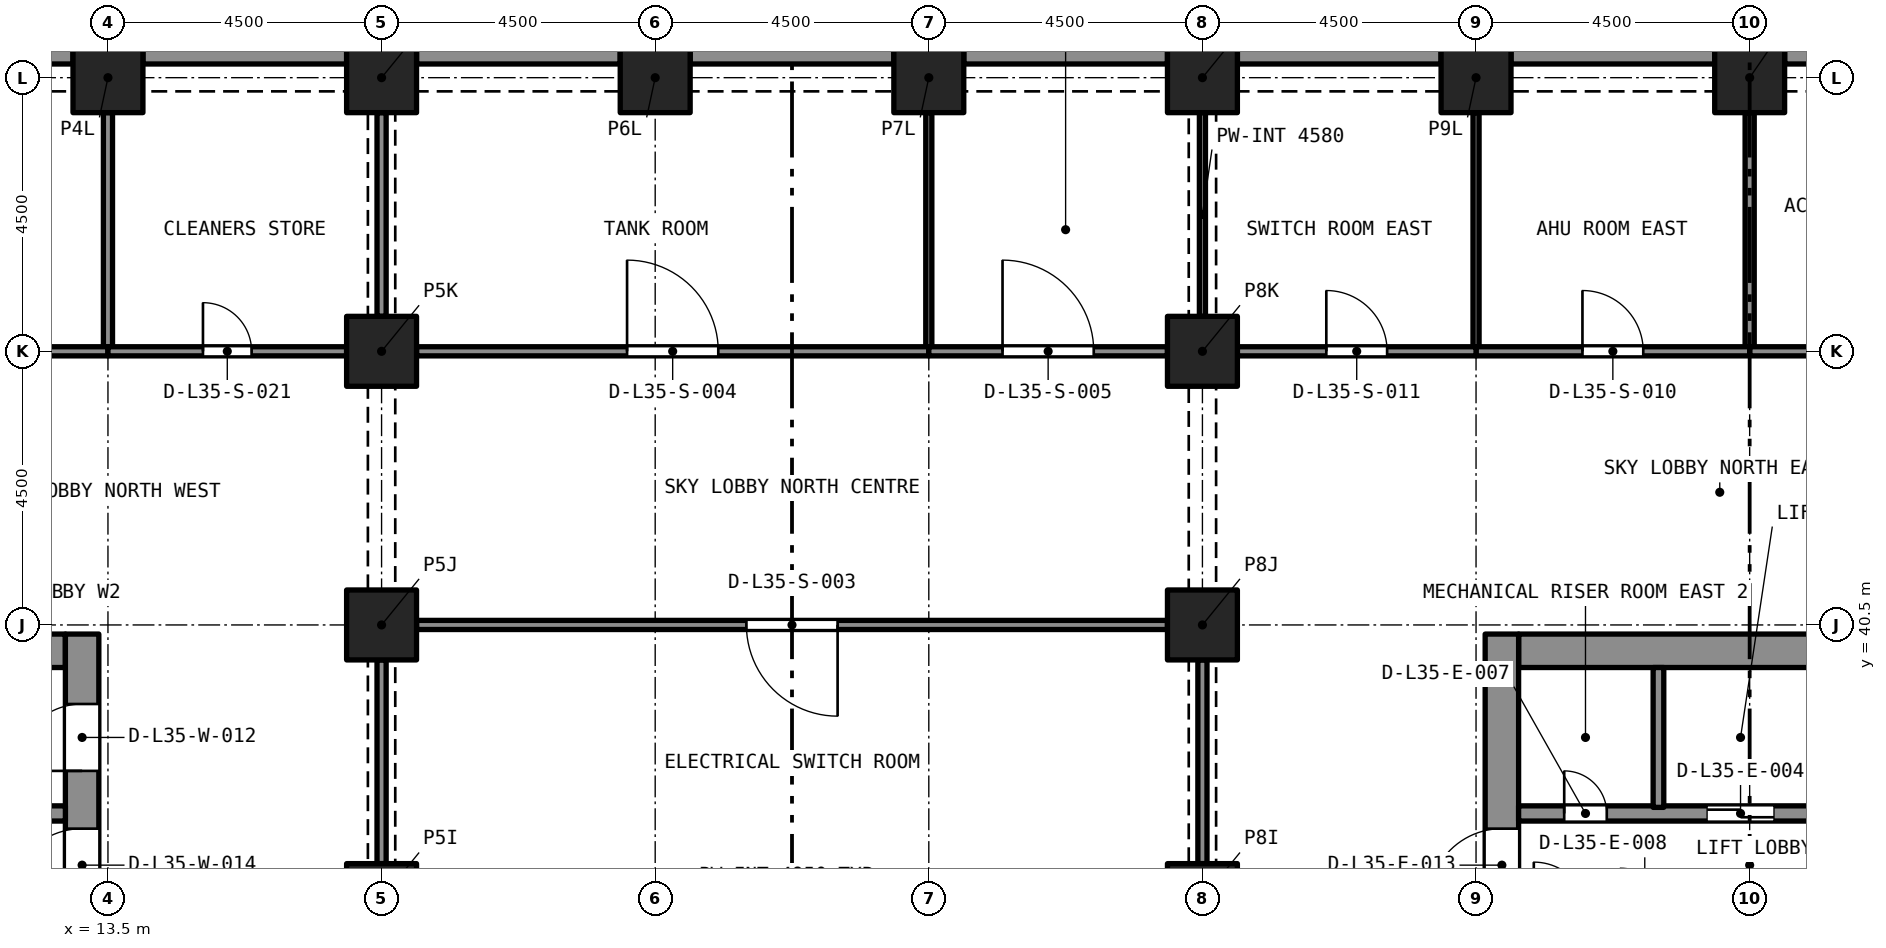
"""IFC4 building model, lengths in metres.
Left out: names, types, materials, properties, quantities, classifications, styles, units other than length and angle.
Written with IfcOpenShell. Run it as: python <this file> out.ifc"""

import sys

from ifc_helpers import new_model, si_unit, direction, frame, frame_2d, origin, origin_2d, place, context, subcontext, project, spatial, rectangle, extrude, element, fill, save


model = new_model("IFC4")
c1 = context("Model", 3, precision=1e-05, world=origin(), true_north=direction((0.0, 1.0)))
c2 = subcontext(c1, "Body", "Model", "MODEL_VIEW")
j1 = project(units=[si_unit("LENGTHUNIT", "METRE"), si_unit("PLANEANGLEUNIT", "RADIAN")], contexts=[c1])
p1 = place(None, origin())
s1 = spatial("IfcSite", under=j1, at=p1, CompositionType="ELEMENT")
p2 = place(p1, origin())
s2 = spatial("IfcBuilding", under=s1, at=p2, CompositionType="ELEMENT")
p3 = place(p2, frame((0.0, 0.0, 124.8)))
s3 = spatial("IfcBuildingStorey", under=s2, at=p3, CompositionType="ELEMENT", Elevation=124.8)
for number, where, z_axis, x_axis in (
    (1, (18.0, 36.0, 0.0), (0.0, 0.0, 1.0), (1.0, 0.0, 0.0)),
    (2, (31.5, 36.0, 0.0), (0.0, 0.0, 1.0), (1.0, 0.0, 0.0)),
    (3, (18.0, 40.5, 0.0), (0.0, 0.0, 1.0), (1.0, 0.0, 0.0)),
    (4, (31.5, 40.5, 0.0), (0.0, 0.0, 1.0), (1.0, 0.0, 0.0)),
    (5, (18.0, 45.0, 0.0), (0.0, 0.0, 1.0), (1.0, 0.0, 0.0)),
    (6, (31.5, 45.0, 0.0), (0.0, 0.0, 1.0), (1.0, 0.0, 0.0)),
    (7, (13.5, 49.5, 0.0), (0.0, 0.0, 1.0), (1.0, 0.0, 0.0)),
    (8, (18.0, 49.5, 0.0), (0.0, 0.0, 1.0), (1.0, 0.0, 0.0)),
    (9, (22.5, 49.5, 0.0), (0.0, 0.0, 1.0), (1.0, 0.0, 0.0)),
    (10, (27.0, 49.5, 0.0), (0.0, 0.0, 1.0), (1.0, 0.0, 0.0)),
    (11, (31.5, 49.5, 0.0), (0.0, 0.0, 1.0), (1.0, 0.0, 0.0)),
    (12, (36.0, 49.5, 0.0), (0.0, 0.0, 1.0), (1.0, 0.0, 0.0)),
    (13, (40.5, 49.5, 0.0), (0.0, 0.0, 1.0), (1.0, 0.0, 0.0)),
):
    element("IfcColumn", number, at=place(p3, frame(where, z_axis=z_axis, x_axis=x_axis)), inside=s3, PredefinedType="COLUMN", context=c2, shape_type="SweptSolid", body=[
        extrude(rectangle(XDim=1.15, YDim=1.15, at=origin_2d()), origin(), (0.0, 0.0, 1.0), 5.4),
    ])
p4 = place(p3, frame((5.2, 40.075, 0.0), z_axis=(0.0, 0.0, 1.0), x_axis=(1.0, 0.0, 0.0)))
e14 = element("IfcWall", 14, at=p4, inside=s3, PredefinedType="SOLIDWALL", context=c2, shape_type="SweptSolid", body=[
    extrude(rectangle(XDim=7.6, YDim=0.55, at=frame_2d((3.8, 0.0))), origin(), (0.0, 0.0, 1.0), 5.4),
])
p5 = place(p3, frame((13.075, 27.15, 0.0), z_axis=(0.0, 0.0, 1.0), x_axis=(0.0, 1.0, 0.0)))
e15 = element("IfcWall", 15, at=p5, inside=s3, PredefinedType="SOLIDWALL", context=c2, shape_type="SweptSolid", body=[
    extrude(rectangle(XDim=13.2, YDim=0.55, at=frame_2d((6.6, 0.0))), origin(), (0.0, 0.0, 1.0), 5.4),
])
p6 = place(p5, frame((10.95, 0.0, 0.0)))
e16 = element("IfcOpeningElement", 16, at=p6, cuts=e15, PredefinedType="OPENING", context=c2, shape_type="SweptSolid", body=[
    extrude(rectangle(XDim=1.1, YDim=2.1, at=frame_2d((0.55, 1.05))), frame((0.0, 0.285, 0.0), z_axis=(0.0, -1.0, 0.0), x_axis=(1.0, 0.0, 0.0)), (0.0, 0.0, 1.0), 0.57),
])
p7 = place(p5, frame((8.8, 0.0, 0.0)))
e17 = element("IfcOpeningElement", 17, at=p7, cuts=e15, PredefinedType="OPENING", context=c2, shape_type="SweptSolid", body=[
    extrude(rectangle(XDim=1.2, YDim=2.1, at=frame_2d((0.6, 1.05))), frame((0.0, 0.285, 0.0), z_axis=(0.0, -1.0, 0.0), x_axis=(1.0, 0.0, 0.0)), (0.0, 0.0, 1.0), 0.57),
])
p8 = place(p3, frame((36.7, 40.075, 0.0), z_axis=(0.0, 0.0, 1.0), x_axis=(1.0, 0.0, 0.0)))
e18 = element("IfcWall", 18, at=p8, inside=s3, PredefinedType="SOLIDWALL", context=c2, shape_type="SweptSolid", body=[
    extrude(rectangle(XDim=7.6, YDim=0.55, at=frame_2d((3.8, 0.0))), origin(), (0.0, 0.0, 1.0), 5.4),
])
p9 = place(p3, frame((36.425, 27.15, 0.0), z_axis=(0.0, 0.0, 1.0), x_axis=(0.0, 1.0, 0.0)))
e19 = element("IfcWall", 19, at=p9, inside=s3, PredefinedType="SOLIDWALL", context=c2, shape_type="SweptSolid", body=[
    extrude(rectangle(XDim=13.2, YDim=0.55, at=frame_2d((6.6, 0.0))), origin(), (0.0, 0.0, 1.0), 5.4),
])
p10 = place(p9, frame((8.8, 0.0, 0.0)))
e20 = element("IfcOpeningElement", 20, at=p10, cuts=e19, PredefinedType="OPENING", context=c2, shape_type="SweptSolid", body=[
    extrude(rectangle(XDim=1.2, YDim=2.1, at=frame_2d((0.6, 1.05))), frame((0.0, 0.285, 0.0), z_axis=(0.0, -1.0, 0.0), x_axis=(1.0, 0.0, 0.0)), (0.0, 0.0, 1.0), 0.57),
])
for number, where, z_axis, x_axis in (
    (21, (41.075, 49.875, 0.0), (0.0, 0.0, 1.0), (1.0, 0.0, 0.0)),
    (22, (36.575, 49.875, 0.0), (0.0, 0.0, 1.0), (1.0, 0.0, 0.0)),
    (23, (32.075, 49.875, 0.0), (0.0, 0.0, 1.0), (1.0, 0.0, 0.0)),
    (24, (27.575, 49.875, 0.0), (0.0, 0.0, 1.0), (1.0, 0.0, 0.0)),
    (25, (23.075, 49.875, 0.0), (0.0, 0.0, 1.0), (1.0, 0.0, 0.0)),
    (26, (18.575, 49.875, 0.0), (0.0, 0.0, 1.0), (1.0, 0.0, 0.0)),
    (27, (14.075, 49.875, 0.0), (0.0, 0.0, 1.0), (1.0, 0.0, 0.0)),
    (28, (9.575, 49.875, 0.0), (0.0, 0.0, 1.0), (1.0, 0.0, 0.0)),
):
    element("IfcWall", number, at=place(p3, frame(where, z_axis=z_axis, x_axis=x_axis)), inside=s3, PredefinedType="SOLIDWALL", context=c2, shape_type="SweptSolid", body=[
        extrude(rectangle(XDim=3.35, YDim=0.3, at=frame_2d((1.675, 0.0))), origin(), (0.0, 0.0, 1.0), 5.4),
    ])
p11 = place(p3, frame((5.2, 37.4, 0.0), z_axis=(0.0, 0.0, 1.0), x_axis=(1.0, 0.0, 0.0)))
e29 = element("IfcWall", 29, at=p11, inside=s3, PredefinedType="SOLIDWALL", context=c2, shape_type="SweptSolid", body=[
    extrude(rectangle(XDim=7.6, YDim=0.25, at=frame_2d((3.8, 0.0))), origin(), (0.0, 0.0, 1.0), 5.1),
])
p12 = place(p11, frame((0.7, 0.0, 0.0)))
e30 = element("IfcOpeningElement", 30, at=p12, cuts=e29, PredefinedType="OPENING", context=c2, shape_type="SweptSolid", body=[
    extrude(rectangle(XDim=1.1, YDim=2.4, at=frame_2d((0.55, 1.2))), frame((0.0, 0.135, 0.0), z_axis=(0.0, -1.0, 0.0), x_axis=(1.0, 0.0, 0.0)), (0.0, 0.0, 1.0), 0.27),
])
p13 = place(p3, frame((36.7, 37.4, 0.0), z_axis=(0.0, 0.0, 1.0), x_axis=(1.0, 0.0, 0.0)))
e31 = element("IfcWall", 31, at=p13, inside=s3, PredefinedType="SOLIDWALL", context=c2, shape_type="SweptSolid", body=[
    extrude(rectangle(XDim=7.6, YDim=0.25, at=frame_2d((3.8, 0.0))), origin(), (0.0, 0.0, 1.0), 5.1),
])
p14 = place(p13, frame((5.8, 0.0, 0.0)))
e32 = element("IfcOpeningElement", 32, at=p14, cuts=e31, PredefinedType="OPENING", context=c2, shape_type="SweptSolid", body=[
    extrude(rectangle(XDim=1.1, YDim=2.4, at=frame_2d((0.55, 1.2))), frame((0.0, 0.135, 0.0), z_axis=(0.0, -1.0, 0.0), x_axis=(1.0, 0.0, 0.0)), (0.0, 0.0, 1.0), 0.27),
])
p15 = place(p13, frame((3.1, 0.0, 0.0)))
e33 = element("IfcOpeningElement", 33, at=p15, cuts=e31, PredefinedType="OPENING", context=c2, shape_type="SweptSolid", body=[
    extrude(rectangle(XDim=1.1, YDim=2.4, at=frame_2d((0.55, 1.2))), frame((0.0, 0.135, 0.0), z_axis=(0.0, -1.0, 0.0), x_axis=(1.0, 0.0, 0.0)), (0.0, 0.0, 1.0), 0.27),
])
p16 = place(p13, frame((0.75, 0.0, 0.0)))
e34 = element("IfcOpeningElement", 34, at=p16, cuts=e31, PredefinedType="OPENING", context=c2, shape_type="SweptSolid", body=[
    extrude(rectangle(XDim=0.7, YDim=2.1, at=frame_2d((0.35, 1.05))), frame((0.0, 0.135, 0.0), z_axis=(0.0, -1.0, 0.0), x_axis=(1.0, 0.0, 0.0)), (0.0, 0.0, 1.0), 0.27),
])
p17 = place(p3, frame((39.0, 37.5, 0.0), z_axis=(0.0, 0.0, 1.0), x_axis=(0.0, 1.0, 0.0)))
e35 = element("IfcWall", 35, at=p17, inside=s3, PredefinedType="SOLIDWALL", context=c2, shape_type="SweptSolid", body=[
    extrude(rectangle(XDim=2.3, YDim=0.175, at=frame_2d((1.15, 0.0))), origin(), (0.0, 0.0, 1.0), 5.1),
])
p18 = place(p3, frame((30.925, 40.5, 0.0), z_axis=(0.0, 0.0, 1.0), x_axis=(-1.0, 0.0, 0.0)))
e36 = element("IfcWall", 36, at=p18, inside=s3, PredefinedType="PARTITIONING", context=c2, shape_type="SweptSolid", body=[
    extrude(rectangle(XDim=12.35, YDim=0.15, at=frame_2d((6.175, 0.0))), origin(), (0.0, 0.0, 1.0), 4.95),
])
p19 = place(p18, frame((5.425, 0.0, 0.0)))
e37 = element("IfcOpeningElement", 37, at=p19, cuts=e36, PredefinedType="OPENING", context=c2, shape_type="SweptSolid", body=[
    extrude(rectangle(XDim=1.5, YDim=2.4, at=frame_2d((0.75, 1.2))), frame((0.0, 0.085, 0.0), z_axis=(0.0, -1.0, 0.0), x_axis=(1.0, 0.0, 0.0)), (0.0, 0.0, 1.0), 0.17),
])
for number, where, z_axis, x_axis in (
    (38, (31.5, 36.575, 0.0), (0.0, 0.0, 1.0), (0.0, 1.0, 0.0)),
    (39, (18.0, 36.575, 0.0), (0.0, 0.0, 1.0), (0.0, 1.0, 0.0)),
):
    element("IfcWall", number, at=place(p3, frame(where, z_axis=z_axis, x_axis=x_axis)), inside=s3, PredefinedType="PARTITIONING", context=c2, shape_type="SweptSolid", body=[
        extrude(rectangle(XDim=3.35, YDim=0.15, at=frame_2d((1.675, 0.0))), origin(), (0.0, 0.0, 1.0), 4.58),
    ])
p20 = place(p3, frame((27.0, 45.075, 0.0), z_axis=(0.0, 0.0, 1.0), x_axis=(0.0, 1.0, 0.0)))
e40 = element("IfcWall", 40, at=p20, inside=s3, PredefinedType="PARTITIONING", context=c2, shape_type="SweptSolid", body=[
    extrude(rectangle(XDim=3.85, YDim=0.1, at=frame_2d((1.925, 0.0))), origin(), (0.0, 0.0, 1.0), 4.95),
])
p21 = place(p3, frame((18.575, 45.0, 0.0), z_axis=(0.0, 0.0, 1.0), x_axis=(1.0, 0.0, 0.0)))
e41 = element("IfcWall", 41, at=p21, inside=s3, PredefinedType="PARTITIONING", context=c2, shape_type="SweptSolid", body=[
    extrude(rectangle(XDim=8.425, YDim=0.15, at=frame_2d((4.212, 0.0))), origin(), (0.0, 0.0, 1.0), 4.95),
])
p22 = place(p21, frame((3.462, 0.0, 0.0)))
e42 = element("IfcOpeningElement", 42, at=p22, cuts=e41, PredefinedType="OPENING", context=c2, shape_type="SweptSolid", body=[
    extrude(rectangle(XDim=1.5, YDim=2.4, at=frame_2d((0.75, 1.2))), frame((0.0, 0.085, 0.0), z_axis=(0.0, -1.0, 0.0), x_axis=(1.0, 0.0, 0.0)), (0.0, 0.0, 1.0), 0.17),
])
p23 = place(p3, frame((18.0, 45.575, 0.0), z_axis=(0.0, 0.0, 1.0), x_axis=(0.0, 1.0, 0.0)))
e43 = element("IfcWall", 43, at=p23, inside=s3, PredefinedType="PARTITIONING", context=c2, shape_type="SweptSolid", body=[
    extrude(rectangle(XDim=3.35, YDim=0.15, at=frame_2d((1.675, 0.0))), origin(), (0.0, 0.0, 1.0), 4.58),
])
p24 = place(p3, frame((27.0, 45.0, 0.0), z_axis=(0.0, 0.0, 1.0), x_axis=(1.0, 0.0, 0.0)))
e44 = element("IfcWall", 44, at=p24, inside=s3, PredefinedType="PARTITIONING", context=c2, shape_type="SweptSolid", body=[
    extrude(rectangle(XDim=3.925, YDim=0.15, at=frame_2d((1.962, 0.0))), origin(), (0.0, 0.0, 1.0), 4.95),
])
p25 = place(p24, frame((1.212, 0.0, 0.0)))
e45 = element("IfcOpeningElement", 45, at=p25, cuts=e44, PredefinedType="OPENING", context=c2, shape_type="SweptSolid", body=[
    extrude(rectangle(XDim=1.5, YDim=2.4, at=frame_2d((0.75, 1.2))), frame((0.0, 0.085, 0.0), z_axis=(0.0, -1.0, 0.0), x_axis=(1.0, 0.0, 0.0)), (0.0, 0.0, 1.0), 0.17),
])
p26 = place(p3, frame((31.5, 45.575, 0.0), z_axis=(0.0, 0.0, 1.0), x_axis=(0.0, 1.0, 0.0)))
e46 = element("IfcWall", 46, at=p26, inside=s3, PredefinedType="PARTITIONING", context=c2, shape_type="SweptSolid", body=[
    extrude(rectangle(XDim=3.35, YDim=0.1, at=frame_2d((1.675, 0.0))), origin(), (0.0, 0.0, 1.0), 4.58),
])
p27 = place(p3, frame((40.5, 45.075, 0.0), z_axis=(0.0, 0.0, 1.0), x_axis=(0.0, 1.0, 0.0)))
e47 = element("IfcWall", 47, at=p27, inside=s3, PredefinedType="PARTITIONING", context=c2, shape_type="SweptSolid", body=[
    extrude(rectangle(XDim=3.85, YDim=0.15, at=frame_2d((1.925, 0.0))), origin(), (0.0, 0.0, 1.0), 5.1),
])
p28 = place(p3, frame((40.5, 45.0, 0.0), z_axis=(0.0, 0.0, 1.0), x_axis=(1.0, 0.0, 0.0)))
e48 = element("IfcWall", 48, at=p28, inside=s3, PredefinedType="PARTITIONING", context=c2, shape_type="SweptSolid", body=[
    extrude(rectangle(XDim=4.5, YDim=0.15, at=frame_2d((2.25, 0.0))), origin(), (0.0, 0.0, 1.0), 5.1),
])
p29 = place(p28, frame((1.85, 0.0, 0.0)))
e49 = element("IfcOpeningElement", 49, at=p29, cuts=e48, PredefinedType="OPENING", context=c2, shape_type="SweptSolid", body=[
    extrude(rectangle(XDim=0.8, YDim=2.1, at=frame_2d((0.4, 1.05))), frame((0.0, 0.085, 0.0), z_axis=(0.0, -1.0, 0.0), x_axis=(1.0, 0.0, 0.0)), (0.0, 0.0, 1.0), 0.17),
])
p30 = place(p3, frame((36.0, 45.075, 0.0), z_axis=(0.0, 0.0, 1.0), x_axis=(0.0, 1.0, 0.0)))
e50 = element("IfcWall", 50, at=p30, inside=s3, PredefinedType="PARTITIONING", context=c2, shape_type="SweptSolid", body=[
    extrude(rectangle(XDim=3.85, YDim=0.1, at=frame_2d((1.925, 0.0))), origin(), (0.0, 0.0, 1.0), 5.1),
])
p31 = place(p3, frame((36.0, 45.0, 0.0), z_axis=(0.0, 0.0, 1.0), x_axis=(1.0, 0.0, 0.0)))
e51 = element("IfcWall", 51, at=p31, inside=s3, PredefinedType="PARTITIONING", context=c2, shape_type="SweptSolid", body=[
    extrude(rectangle(XDim=4.5, YDim=0.15, at=frame_2d((2.25, 0.0))), origin(), (0.0, 0.0, 1.0), 5.1),
])
p32 = place(p31, frame((1.75, 0.0, 0.0)))
e52 = element("IfcOpeningElement", 52, at=p32, cuts=e51, PredefinedType="OPENING", context=c2, shape_type="SweptSolid", body=[
    extrude(rectangle(XDim=1.0, YDim=2.1, at=frame_2d((0.5, 1.05))), frame((0.0, 0.085, 0.0), z_axis=(0.0, -1.0, 0.0), x_axis=(1.0, 0.0, 0.0)), (0.0, 0.0, 1.0), 0.17),
])
p33 = place(p3, frame((32.075, 45.0, 0.0), z_axis=(0.0, 0.0, 1.0), x_axis=(1.0, 0.0, 0.0)))
e53 = element("IfcWall", 53, at=p33, inside=s3, PredefinedType="PARTITIONING", context=c2, shape_type="SweptSolid", body=[
    extrude(rectangle(XDim=3.925, YDim=0.15, at=frame_2d((1.962, 0.0))), origin(), (0.0, 0.0, 1.0), 5.1),
])
p34 = place(p33, frame((1.462, 0.0, 0.0)))
e54 = element("IfcOpeningElement", 54, at=p34, cuts=e53, PredefinedType="OPENING", context=c2, shape_type="SweptSolid", body=[
    extrude(rectangle(XDim=1.0, YDim=2.1, at=frame_2d((0.5, 1.05))), frame((0.0, 0.085, 0.0), z_axis=(0.0, -1.0, 0.0), x_axis=(1.0, 0.0, 0.0)), (0.0, 0.0, 1.0), 0.17),
])
p35 = place(p3, frame((13.5, 45.075, 0.0), z_axis=(0.0, 0.0, 1.0), x_axis=(0.0, 1.0, 0.0)))
e55 = element("IfcWall", 55, at=p35, inside=s3, PredefinedType="PARTITIONING", context=c2, shape_type="SweptSolid", body=[
    extrude(rectangle(XDim=3.85, YDim=0.15, at=frame_2d((1.925, 0.0))), origin(), (0.0, 0.0, 1.0), 5.1),
])
p36 = place(p3, frame((9.0, 45.0, 0.0), z_axis=(0.0, 0.0, 1.0), x_axis=(1.0, 0.0, 0.0)))
e56 = element("IfcWall", 56, at=p36, inside=s3, PredefinedType="PARTITIONING", context=c2, shape_type="SweptSolid", body=[
    extrude(rectangle(XDim=4.5, YDim=0.15, at=frame_2d((2.25, 0.0))), origin(), (0.0, 0.0, 1.0), 5.1),
])
p37 = place(p36, frame((1.75, 0.0, 0.0)))
e57 = element("IfcOpeningElement", 57, at=p37, cuts=e56, PredefinedType="OPENING", context=c2, shape_type="SweptSolid", body=[
    extrude(rectangle(XDim=1.0, YDim=2.1, at=frame_2d((0.5, 1.05))), frame((0.0, 0.085, 0.0), z_axis=(0.0, -1.0, 0.0), x_axis=(1.0, 0.0, 0.0)), (0.0, 0.0, 1.0), 0.17),
])
p38 = place(p3, frame((13.5, 45.0, 0.0), z_axis=(0.0, 0.0, 1.0), x_axis=(1.0, 0.0, 0.0)))
e58 = element("IfcWall", 58, at=p38, inside=s3, PredefinedType="PARTITIONING", context=c2, shape_type="SweptSolid", body=[
    extrude(rectangle(XDim=3.925, YDim=0.15, at=frame_2d((1.962, 0.0))), origin(), (0.0, 0.0, 1.0), 5.1),
])
p39 = place(p38, frame((1.562, 0.0, 0.0)))
e59 = element("IfcOpeningElement", 59, at=p39, cuts=e58, PredefinedType="OPENING", context=c2, shape_type="SweptSolid", body=[
    extrude(rectangle(XDim=0.8, YDim=2.1, at=frame_2d((0.4, 1.05))), frame((0.0, 0.085, 0.0), z_axis=(0.0, -1.0, 0.0), x_axis=(1.0, 0.0, 0.0)), (0.0, 0.0, 1.0), 0.17),
])
p40 = place(p6, origin())
e60 = element("IfcDoor", 60, at=p40, inside=s3, OperationType="SINGLE_SWING_LEFT", PredefinedType="DOOR", context=c2, shape_type="SweptSolid", body=[
    extrude(rectangle(XDim=1.1, YDim=2.1, at=frame_2d((0.55, 1.05))), frame((0.0, 0.025, 0.0), z_axis=(0.0, -1.0, 0.0), x_axis=(1.0, 0.0, 0.0)), (0.0, 0.0, 1.0), 0.05),
])
fill(e16, e60)
p41 = place(p7, origin())
e61 = element("IfcDoor", 61, at=p41, inside=s3, OperationType="SINGLE_SWING_LEFT", PredefinedType="DOOR", context=c2, shape_type="SweptSolid", body=[
    extrude(rectangle(XDim=1.2, YDim=2.1, at=frame_2d((0.6, 1.05))), frame((0.0, 0.025, 0.0), z_axis=(0.0, -1.0, 0.0), x_axis=(1.0, 0.0, 0.0)), (0.0, 0.0, 1.0), 0.05),
])
fill(e17, e61)
p42 = place(p15, origin())
e62 = element("IfcDoor", 62, at=p42, inside=s3, OperationType="SLIDING_TO_LEFT", PredefinedType="DOOR", context=c2, shape_type="SweptSolid", body=[
    extrude(rectangle(XDim=1.1, YDim=2.4, at=frame_2d((0.55, 1.2))), frame((0.0, 0.025, 0.0), z_axis=(0.0, -1.0, 0.0), x_axis=(1.0, 0.0, 0.0)), (0.0, 0.0, 1.0), 0.05),
])
fill(e33, e62)
p43 = place(p16, origin())
e63 = element("IfcDoor", 63, at=p43, inside=s3, OperationType="SINGLE_SWING_LEFT", PredefinedType="DOOR", context=c2, shape_type="SweptSolid", body=[
    extrude(rectangle(XDim=0.7, YDim=2.1, at=frame_2d((0.35, 1.05))), frame((0.0, 0.025, 0.0), z_axis=(0.0, -1.0, 0.0), x_axis=(1.0, 0.0, 0.0)), (0.0, 0.0, 1.0), 0.05),
])
fill(e34, e63)
p44 = place(p10, origin())
e64 = element("IfcDoor", 64, at=p44, inside=s3, OperationType="SINGLE_SWING_LEFT", PredefinedType="DOOR", context=c2, shape_type="SweptSolid", body=[
    extrude(rectangle(XDim=1.2, YDim=2.1, at=frame_2d((0.6, 1.05))), frame((0.0, 0.025, 0.0), z_axis=(0.0, -1.0, 0.0), x_axis=(1.0, 0.0, 0.0)), (0.0, 0.0, 1.0), 0.05),
])
fill(e20, e64)
p45 = place(p19, origin())
e65 = element("IfcDoor", 65, at=p45, inside=s3, OperationType="DOUBLE_DOOR_SINGLE_SWING", PredefinedType="DOOR", context=c2, shape_type="SweptSolid", body=[
    extrude(rectangle(XDim=1.5, YDim=2.4, at=frame_2d((0.75, 1.2))), frame((0.0, 0.025, 0.0), z_axis=(0.0, -1.0, 0.0), x_axis=(1.0, 0.0, 0.0)), (0.0, 0.0, 1.0), 0.05),
])
fill(e37, e65)
p46 = place(p22, origin())
e66 = element("IfcDoor", 66, at=p46, inside=s3, OperationType="DOUBLE_DOOR_SINGLE_SWING", PredefinedType="DOOR", context=c2, shape_type="SweptSolid", body=[
    extrude(rectangle(XDim=1.5, YDim=2.4, at=frame_2d((0.75, 1.2))), frame((0.0, 0.025, 0.0), z_axis=(0.0, -1.0, 0.0), x_axis=(1.0, 0.0, 0.0)), (0.0, 0.0, 1.0), 0.05),
])
fill(e42, e66)
p47 = place(p25, origin())
e67 = element("IfcDoor", 67, at=p47, inside=s3, OperationType="DOUBLE_DOOR_SINGLE_SWING", PredefinedType="DOOR", context=c2, shape_type="SweptSolid", body=[
    extrude(rectangle(XDim=1.5, YDim=2.4, at=frame_2d((0.75, 1.2))), frame((0.0, 0.025, 0.0), z_axis=(0.0, -1.0, 0.0), x_axis=(1.0, 0.0, 0.0)), (0.0, 0.0, 1.0), 0.05),
])
fill(e45, e67)
p48 = place(p32, origin())
e68 = element("IfcDoor", 68, at=p48, inside=s3, OperationType="SINGLE_SWING_RIGHT", PredefinedType="DOOR", context=c2, shape_type="SweptSolid", body=[
    extrude(rectangle(XDim=1.0, YDim=2.1, at=frame_2d((0.5, 1.05))), frame((0.0, 0.025, 0.0), z_axis=(0.0, -1.0, 0.0), x_axis=(1.0, 0.0, 0.0)), (0.0, 0.0, 1.0), 0.05),
])
fill(e52, e68)
p49 = place(p34, origin())
e69 = element("IfcDoor", 69, at=p49, inside=s3, OperationType="SINGLE_SWING_RIGHT", PredefinedType="DOOR", context=c2, shape_type="SweptSolid", body=[
    extrude(rectangle(XDim=1.0, YDim=2.1, at=frame_2d((0.5, 1.05))), frame((0.0, 0.025, 0.0), z_axis=(0.0, -1.0, 0.0), x_axis=(1.0, 0.0, 0.0)), (0.0, 0.0, 1.0), 0.05),
])
fill(e54, e69)
p50 = place(p39, origin())
e70 = element("IfcDoor", 70, at=p50, inside=s3, OperationType="SINGLE_SWING_RIGHT", PredefinedType="DOOR", context=c2, shape_type="SweptSolid", body=[
    extrude(rectangle(XDim=0.8, YDim=2.1, at=frame_2d((0.4, 1.05))), frame((0.0, 0.025, 0.0), z_axis=(0.0, -1.0, 0.0), x_axis=(1.0, 0.0, 0.0)), (0.0, 0.0, 1.0), 0.05),
])
fill(e59, e70)
save(model, sys.argv[1])
